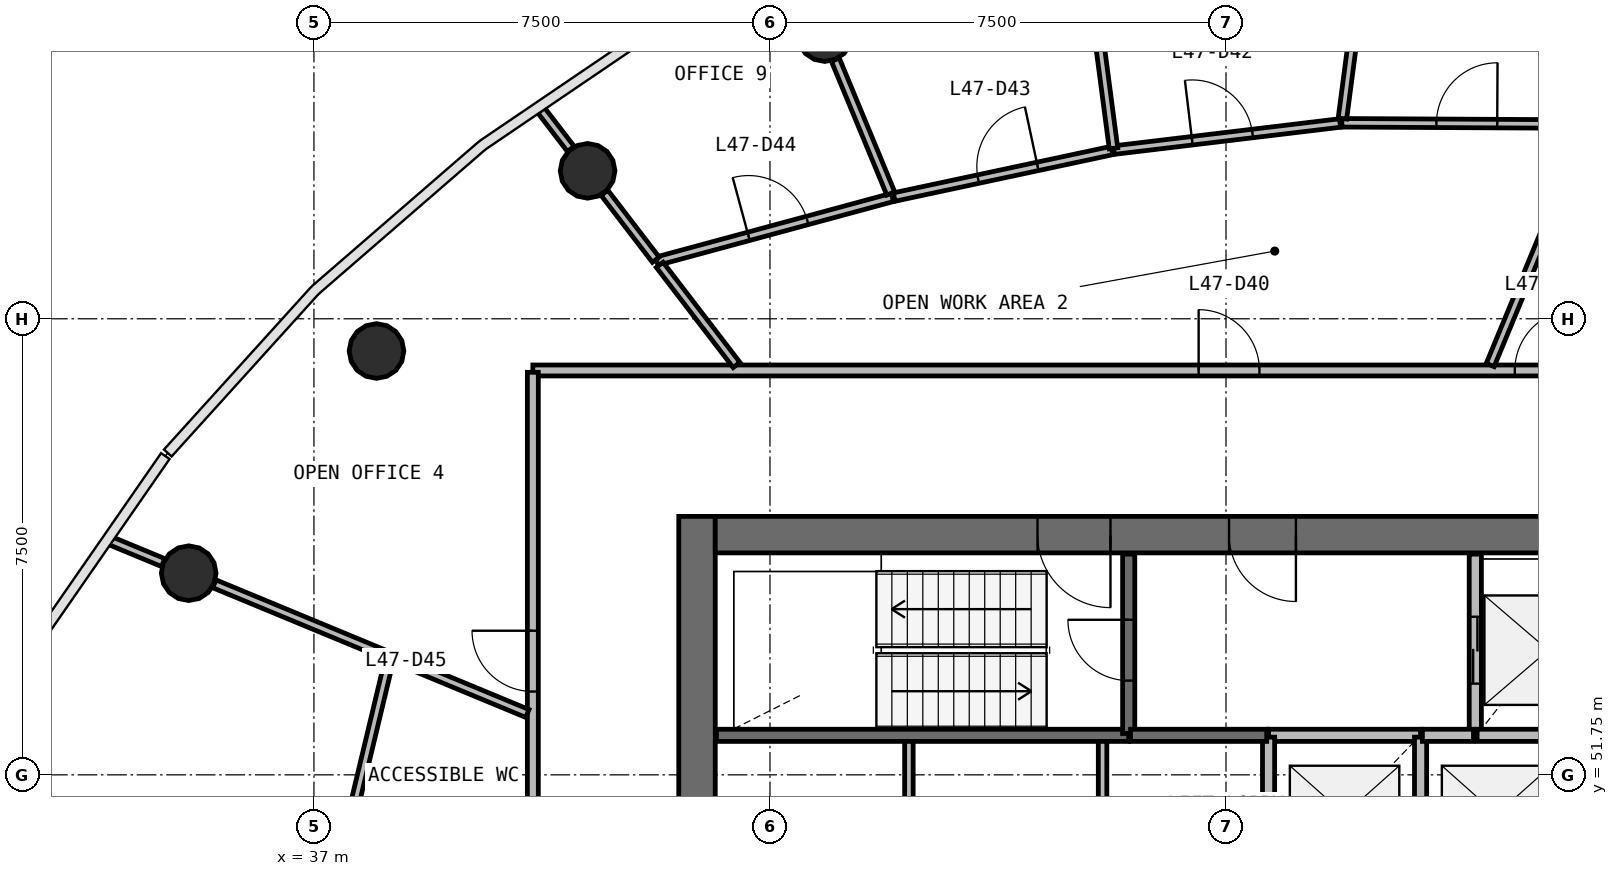
"""IFC4 building model, lengths in metres.
Left out: names, types, materials, properties, quantities, classifications, styles, units other than length and angle.
Written with IfcOpenShell. Run it as: python <this file> out.ifc"""

import sys

from ifc_helpers import new_model, si_unit, direction, frame, frame_2d, origin, origin_2d, place, context, subcontext, project, spatial, rectangle, circle, extrude, source, transform, mapped, element, fill, save


model = new_model("IFC4")
c1 = context("Model", 3, precision=1e-05, world=origin(), true_north=direction((0.0, 1.0)))
c2 = subcontext(c1, "Body", "Model", "MODEL_VIEW")
j1 = project(units=[si_unit("LENGTHUNIT", "METRE"), si_unit("PLANEANGLEUNIT", "RADIAN")], contexts=[c1])
p1 = place(None, origin())
s1 = spatial("IfcSite", under=j1, at=p1, CompositionType="ELEMENT")
p2 = place(p1, origin())
s2 = spatial("IfcBuilding", under=s1, at=p2, CompositionType="ELEMENT")
p3 = place(p2, frame((0.0, 0.0, 195.5)))
s3 = spatial("IfcBuildingStorey", under=s2, at=p3, CompositionType="ELEMENT", Elevation=195.5)
p4 = place(p3, frame((43.3, 56.0, 0.0), z_axis=(0.0, 0.0, 1.0), x_axis=(0.0, -1.0, 0.0)))
e1 = element("IfcWall", 1, at=p4, inside=s3, PredefinedType="SHEAR", context=c2, shape_type="SweptSolid", body=[
    extrude(rectangle(XDim=16.0, YDim=0.6, at=frame_2d((8.0, 0.0))), origin(), (0.0, 0.0, 1.0), 3.9),
])
p5 = place(p4, frame((7.1, 0.0, 0.0)))
e2 = element("IfcOpeningElement", 2, at=p5, cuts=e1, PredefinedType="OPENING", context=c2, shape_type="SweptSolid", body=[
    extrude(rectangle(XDim=1.8, YDim=2.1, at=frame_2d((0.9, 1.05))), frame((0.0, 0.31, 0.0), z_axis=(0.0, -1.0, 0.0), x_axis=(1.0, 0.0, 0.0)), (0.0, 0.0, 1.0), 0.62),
])
p6 = place(p3, frame((60.4, 55.7, 0.0), z_axis=(0.0, 0.0, 1.0), x_axis=(-1.0, 0.0, 0.0)))
e3 = element("IfcWall", 3, at=p6, inside=s3, PredefinedType="SHEAR", context=c2, shape_type="SweptSolid", body=[
    extrude(rectangle(XDim=16.8, YDim=0.6, at=frame_2d((8.4, 0.0))), origin(), (0.0, 0.0, 1.0), 3.9),
])
p7 = place(p6, frame((0.4, 0.0, 0.0)))
e4 = element("IfcOpeningElement", 4, at=p7, cuts=e3, PredefinedType="OPENING", context=c2, shape_type="SweptSolid", body=[
    extrude(rectangle(XDim=1.1, YDim=2.1, at=frame_2d((0.55, 1.05))), frame((0.0, 0.31, 0.0), z_axis=(0.0, -1.0, 0.0), x_axis=(1.0, 0.0, 0.0)), (0.0, 0.0, 1.0), 0.62),
])
p8 = place(p6, frame((10.3, 0.0, 0.0)))
e5 = element("IfcOpeningElement", 5, at=p8, cuts=e3, PredefinedType="OPENING", context=c2, shape_type="SweptSolid", body=[
    extrude(rectangle(XDim=1.2, YDim=2.1, at=frame_2d((0.6, 1.05))), frame((0.0, 0.31, 0.0), z_axis=(0.0, -1.0, 0.0), x_axis=(1.0, 0.0, 0.0)), (0.0, 0.0, 1.0), 0.62),
])
p9 = place(p6, frame((7.25, 0.0, 0.0)))
e6 = element("IfcOpeningElement", 6, at=p9, cuts=e3, PredefinedType="OPENING", context=c2, shape_type="SweptSolid", body=[
    extrude(rectangle(XDim=1.1, YDim=2.1, at=frame_2d((0.55, 1.05))), frame((0.0, 0.31, 0.0), z_axis=(0.0, -1.0, 0.0), x_axis=(1.0, 0.0, 0.0)), (0.0, 0.0, 1.0), 0.62),
])
m1 = source(origin(), c2, "Body", "SweptSolid", [
    extrude(circle(Radius=0.45, at=origin_2d()), origin(), (0.0, 0.0, 1.0), 3.9),
])
for number, where, z_axis, x_axis in (
    (7, (45.401, 63.931, 0.0), (0.0, 0.0, 1.0), (1.0, 0.0, 0.0)),
    (8, (41.501, 61.683, 0.0), (0.0, 0.0, 1.0), (1.0, 0.0, 0.0)),
    (9, (38.029, 58.72, 0.0), (0.0, 0.0, 1.0), (1.0, 0.0, 0.0)),
    (10, (34.941, 55.066, 0.0), (0.0, 0.0, 1.0), (1.0, 0.0, 0.0)),
):
    element("IfcColumn", number, at=place(p3, frame(where, z_axis=z_axis, x_axis=x_axis)), inside=s3, PredefinedType="COLUMN", context=c2, shape_type="MappedRepresentation", body=[
        mapped(m1, transform((0.0, 0.0, 0.0), scale=1.0)),
    ])
p10 = place(p3, frame((43.62, 52.4, 0.0), z_axis=(0.0, 0.0, 1.0), x_axis=(1.0, 0.0, 0.0)))
e11 = element("IfcWall", 11, at=p10, inside=s3, PredefinedType="SOLIDWALL", context=c2, shape_type="SweptSolid", body=[
    extrude(rectangle(XDim=6.78, YDim=0.2, at=frame_2d((3.39, 0.0))), origin(), (0.0, 0.0, 1.0), 3.58),
])
p11 = place(p3, frame((50.4, 52.43, 0.0), z_axis=(0.0, 0.0, 1.0), x_axis=(0.0, 1.0, 0.0)))
e12 = element("IfcWall", 12, at=p11, inside=s3, PredefinedType="SOLIDWALL", context=c2, shape_type="SweptSolid", body=[
    extrude(rectangle(XDim=2.95, YDim=0.2, at=frame_2d((1.475, 0.0))), origin(), (0.0, 0.0, 1.0), 3.58),
])
p12 = place(p11, frame((0.87, 0.0, 0.0)))
e13 = element("IfcOpeningElement", 13, at=p12, cuts=e12, PredefinedType="OPENING", context=c2, shape_type="SweptSolid", body=[
    extrude(rectangle(XDim=1.0, YDim=2.1, at=frame_2d((0.5, 1.05))), frame((0.0, 0.11, 0.0), z_axis=(0.0, -1.0, 0.0), x_axis=(1.0, 0.0, 0.0)), (0.0, 0.0, 1.0), 0.22),
])
p13 = place(p3, frame((56.1, 55.38, 0.0), z_axis=(0.0, 0.0, 1.0), x_axis=(0.0, -1.0, 0.0)))
e14 = element("IfcWall", 14, at=p13, inside=s3, PredefinedType="SOLIDWALL", context=c2, shape_type="SweptSolid", body=[
    extrude(rectangle(XDim=2.98, YDim=0.2, at=frame_2d((1.49, 0.0))), origin(), (0.0, 0.0, 1.0), 3.58),
])
p14 = place(p13, frame((1.03, 0.0, 0.0)))
e15 = element("IfcOpeningElement", 15, at=p14, cuts=e14, PredefinedType="OPENING", context=c2, shape_type="SweptSolid", body=[
    extrude(rectangle(XDim=1.1, YDim=2.1, at=frame_2d((0.55, 1.05))), frame((0.0, 0.11, 0.0), z_axis=(0.0, -1.0, 0.0), x_axis=(1.0, 0.0, 0.0)), (0.0, 0.0, 1.0), 0.22),
])
p15 = place(p3, frame((55.2, 52.4, 0.0), z_axis=(0.0, 0.0, 1.0), x_axis=(-1.0, 0.0, 0.0)))
e16 = element("IfcWall", 16, at=p15, inside=s3, PredefinedType="SOLIDWALL", context=c2, shape_type="SweptSolid", body=[
    extrude(rectangle(XDim=2.5, YDim=0.2, at=frame_2d((1.25, 0.0))), origin(), (0.0, 0.0, 1.0), 3.58),
])
for number, where, z_axis, x_axis in (
    (17, (52.7, 52.37, 0.0), (0.0, 0.0, 1.0), (0.0, -1.0, 0.0)),
    (18, (55.2, 50.01, 0.0), (0.0, 0.0, 1.0), (0.0, 1.0, 0.0)),
):
    element("IfcWall", number, at=place(p3, frame(where, z_axis=z_axis, x_axis=x_axis)), inside=s3, PredefinedType="SOLIDWALL", context=c2, shape_type="SweptSolid", body=[
        extrude(rectangle(XDim=2.36, YDim=0.2, at=frame_2d((1.18, 0.0))), origin(), (0.0, 0.0, 1.0), 3.58),
    ])
p16 = place(p3, frame((50.43, 52.4, 0.0), z_axis=(0.0, 0.0, 1.0), x_axis=(1.0, 0.0, 0.0)))
e19 = element("IfcWall", 19, at=p16, inside=s3, PredefinedType="SOLIDWALL", context=c2, shape_type="SweptSolid", body=[
    extrude(rectangle(XDim=2.24, YDim=0.2, at=frame_2d((1.12, 0.0))), origin(), (0.0, 0.0, 1.0), 3.58),
])
p17 = place(p3, frame((57.67, 52.4, 0.0), z_axis=(0.0, 0.0, 1.0), x_axis=(-1.0, 0.0, 0.0)))
e20 = element("IfcWall", 20, at=p17, inside=s3, PredefinedType="SOLIDWALL", context=c2, shape_type="SweptSolid", body=[
    extrude(rectangle(XDim=1.54, YDim=0.2, at=frame_2d((0.77, 0.0))), origin(), (0.0, 0.0, 1.0), 3.58),
])
p18 = place(p3, frame((56.07, 52.4, 0.0), z_axis=(0.0, 0.0, 1.0), x_axis=(-1.0, 0.0, 0.0)))
e21 = element("IfcWall", 21, at=p18, inside=s3, PredefinedType="SOLIDWALL", context=c2, shape_type="SweptSolid", body=[
    extrude(rectangle(XDim=0.84, YDim=0.2, at=frame_2d((0.42, 0.0))), origin(), (0.0, 0.0, 1.0), 3.58),
])
p19 = place(p3, frame((40.6, 58.4, 0.0), z_axis=(0.0, 0.0, 1.0), x_axis=(1.0, 0.0, 0.0)))
e22 = element("IfcWall", 22, at=p19, inside=s3, PredefinedType="PARTITIONING", context=c2, shape_type="SweptSolid", body=[
    extrude(rectangle(XDim=22.8, YDim=0.18, at=frame_2d((11.4, 0.0))), origin(), (0.0, 0.0, 1.0), 2.88),
])
p20 = place(p19, frame((16.15, 0.0, 0.0)))
e23 = element("IfcOpeningElement", 23, at=p20, cuts=e22, PredefinedType="OPENING", context=c2, shape_type="SweptSolid", body=[
    extrude(rectangle(XDim=1.0, YDim=2.1, at=frame_2d((0.5, 1.05))), frame((0.0, 0.1, 0.0), z_axis=(0.0, -1.0, 0.0), x_axis=(1.0, 0.0, 0.0)), (0.0, 0.0, 1.0), 0.2),
])
p21 = place(p19, frame((10.95, 0.0, 0.0)))
e24 = element("IfcOpeningElement", 24, at=p21, cuts=e22, PredefinedType="OPENING", context=c2, shape_type="SweptSolid", body=[
    extrude(rectangle(XDim=1.0, YDim=2.1, at=frame_2d((0.5, 1.05))), frame((0.0, 0.1, 0.0), z_axis=(0.0, -1.0, 0.0), x_axis=(1.0, 0.0, 0.0)), (0.0, 0.0, 1.0), 0.2),
])
p22 = place(p3, frame((40.6, 37.63, 0.0), z_axis=(0.0, 0.0, 1.0), x_axis=(0.0, 1.0, 0.0)))
e25 = element("IfcWall", 25, at=p22, inside=s3, PredefinedType="PARTITIONING", context=c2, shape_type="SweptSolid", body=[
    extrude(rectangle(XDim=20.74, YDim=0.18, at=frame_2d((10.37, 0.0))), origin(), (0.0, 0.0, 1.0), 2.88),
])
p23 = place(p22, frame((12.19, 0.0, 0.0)))
e26 = element("IfcOpeningElement", 26, at=p23, cuts=e25, PredefinedType="OPENING", context=c2, shape_type="SweptSolid", body=[
    extrude(rectangle(XDim=0.9, YDim=2.1, at=frame_2d((0.45, 1.05))), frame((0.0, 0.1, 0.0), z_axis=(0.0, -1.0, 0.0), x_axis=(1.0, 0.0, 0.0)), (0.0, 0.0, 1.0), 0.2),
])
p24 = place(p22, frame((9.99, 0.0, 0.0)))
e27 = element("IfcOpeningElement", 27, at=p24, cuts=e25, PredefinedType="OPENING", context=c2, shape_type="SweptSolid", body=[
    extrude(rectangle(XDim=0.9, YDim=2.1, at=frame_2d((0.45, 1.05))), frame((0.0, 0.1, 0.0), z_axis=(0.0, -1.0, 0.0), x_axis=(1.0, 0.0, 0.0)), (0.0, 0.0, 1.0), 0.2),
])
p25 = place(p22, frame((7.69, 0.0, 0.0)))
e28 = element("IfcOpeningElement", 28, at=p25, cuts=e25, PredefinedType="OPENING", context=c2, shape_type="SweptSolid", body=[
    extrude(rectangle(XDim=1.0, YDim=2.1, at=frame_2d((0.5, 1.05))), frame((0.0, 0.1, 0.0), z_axis=(0.0, -1.0, 0.0), x_axis=(1.0, 0.0, 0.0)), (0.0, 0.0, 1.0), 0.2),
])
p26 = place(p22, frame((15.49, 0.0, 0.0)))
e29 = element("IfcOpeningElement", 29, at=p26, cuts=e25, PredefinedType="OPENING", context=c2, shape_type="SweptSolid", body=[
    extrude(rectangle(XDim=1.0, YDim=2.1, at=frame_2d((0.5, 1.05))), frame((0.0, 0.1, 0.0), z_axis=(0.0, -1.0, 0.0), x_axis=(1.0, 0.0, 0.0)), (0.0, 0.0, 1.0), 0.2),
])
p27 = place(p3, frame((59.369, 65.789, 0.0), z_axis=(0.0, 0.0, 1.0), x_axis=(-0.382679289053, -0.923881248716, 0.0)))
e30 = element("IfcWall", 30, at=p27, inside=s3, PredefinedType="PARTITIONING", context=c2, shape_type="SweptSolid", body=[
    extrude(rectangle(XDim=7.901, YDim=0.14, at=frame_2d((3.95, 0.0))), origin(), (0.0, 0.0, 1.0), 2.88),
])
p28 = place(p3, frame((40.51, 52.759, 0.0), z_axis=(0.0, 0.0, 1.0), x_axis=(-0.9238758778, 0.382692255499, 0.0)))
e31 = element("IfcWall", 31, at=p28, inside=s3, PredefinedType="PARTITIONING", context=c2, shape_type="SweptSolid", body=[
    extrude(rectangle(XDim=5.573, YDim=0.14, at=frame_2d((2.787, 0.0))), origin(), (0.0, 0.0, 1.0), 2.88),
])
p29 = place(p3, frame((53.906, 62.473, 0.0), z_axis=(0.0, 0.0, 1.0), x_axis=(0.999985936292, -0.005303509904, 0.0)))
e32 = element("IfcWall", 32, at=p29, inside=s3, PredefinedType="PARTITIONING", context=c2, shape_type="SweptSolid", body=[
    extrude(rectangle(XDim=4.005, YDim=0.14, at=frame_2d((2.002, 0.0))), origin(), (0.0, 0.0, 1.0), 2.88),
])
p30 = place(p29, frame((1.555, 0.0, 0.0)))
e33 = element("IfcOpeningElement", 33, at=p30, cuts=e32, PredefinedType="OPENING", context=c2, shape_type="SweptSolid", body=[
    extrude(rectangle(XDim=1.0, YDim=2.1, at=frame_2d((0.5, 1.05))), frame((0.0, 0.08, 0.0), z_axis=(0.0, -1.0, 0.0), x_axis=(1.0, 0.0, 0.0)), (0.0, 0.0, 1.0), 0.16),
])
p31 = place(p3, frame((42.641, 60.198, 0.0), z_axis=(0.0, 0.0, 1.0), x_axis=(0.965275935765, 0.261232401957, 0.0)))
e34 = element("IfcWall", 34, at=p31, inside=s3, PredefinedType="PARTITIONING", context=c2, shape_type="SweptSolid", body=[
    extrude(rectangle(XDim=4.012, YDim=0.14, at=frame_2d((2.006, 0.0))), origin(), (0.0, 0.0, 1.0), 2.88),
])
p32 = place(p31, frame((1.562, 0.0, 0.0)))
e35 = element("IfcOpeningElement", 35, at=p32, cuts=e34, PredefinedType="OPENING", context=c2, shape_type="SweptSolid", body=[
    extrude(rectangle(XDim=1.0, YDim=2.1, at=frame_2d((0.5, 1.05))), frame((0.0, 0.08, 0.0), z_axis=(0.0, -1.0, 0.0), x_axis=(1.0, 0.0, 0.0)), (0.0, 0.0, 1.0), 0.16),
])
p33 = place(p3, frame((38.235, 53.626, 0.0), z_axis=(0.0, 0.0, 1.0), x_axis=(-0.232775534837, -0.97253048815, 0.0)))
e36 = element("IfcWall", 36, at=p33, inside=s3, PredefinedType="PARTITIONING", context=c2, shape_type="SweptSolid", body=[
    extrude(rectangle(XDim=3.771, YDim=0.14, at=frame_2d((1.886, 0.0))), origin(), (0.0, 0.0, 1.0), 2.88),
])
p34 = place(p3, frame((50.154, 62.023, 0.0), z_axis=(0.0, 0.0, 1.0), x_axis=(0.992895317482, 0.118991127913, 0.0)))
e37 = element("IfcWall", 37, at=p34, inside=s3, PredefinedType="PARTITIONING", context=c2, shape_type="SweptSolid", body=[
    extrude(rectangle(XDim=3.749, YDim=0.14, at=frame_2d((1.874, 0.0))), origin(), (0.0, 0.0, 1.0), 2.88),
])
p35 = place(p34, frame((1.299, 0.0, 0.0)))
e38 = element("IfcOpeningElement", 38, at=p35, cuts=e37, PredefinedType="OPENING", context=c2, shape_type="SweptSolid", body=[
    extrude(rectangle(XDim=1.0, YDim=2.1, at=frame_2d((0.5, 1.05))), frame((0.0, 0.08, 0.0), z_axis=(0.0, -1.0, 0.0), x_axis=(1.0, 0.0, 0.0)), (0.0, 0.0, 1.0), 0.16),
])
p36 = place(p3, frame((46.543, 61.252, 0.0), z_axis=(0.0, 0.0, 1.0), x_axis=(0.977922236045, 0.208969137073, 0.0)))
e39 = element("IfcWall", 39, at=p36, inside=s3, PredefinedType="PARTITIONING", context=c2, shape_type="SweptSolid", body=[
    extrude(rectangle(XDim=3.663, YDim=0.14, at=frame_2d((1.831, 0.0))), origin(), (0.0, 0.0, 1.0), 2.88),
])
p37 = place(p36, frame((1.413, 0.0, 0.0)))
e40 = element("IfcOpeningElement", 40, at=p37, cuts=e39, PredefinedType="OPENING", context=c2, shape_type="SweptSolid", body=[
    extrude(rectangle(XDim=1.0, YDim=2.1, at=frame_2d((0.5, 1.05))), frame((0.0, 0.08, 0.0), z_axis=(0.0, -1.0, 0.0), x_axis=(1.0, 0.0, 0.0)), (0.0, 0.0, 1.0), 0.16),
])
p38 = place(p3, frame((53.915, 62.543, 0.0), z_axis=(0.0, 0.0, 1.0), x_axis=(0.130589863737, 0.99143647678, 0.0)))
e41 = element("IfcWall", 41, at=p38, inside=s3, PredefinedType="PARTITIONING", context=c2, shape_type="SweptSolid", body=[
    extrude(rectangle(XDim=3.313, YDim=0.14, at=frame_2d((1.656, 0.0))), origin(), (0.0, 0.0, 1.0), 2.88),
])
p39 = place(p3, frame((50.15, 62.053, 0.0), z_axis=(0.0, 0.0, 1.0), x_axis=(-0.130539730855, 0.991443078885, 0.0)))
e42 = element("IfcWall", 42, at=p39, inside=s3, PredefinedType="PARTITIONING", context=c2, shape_type="SweptSolid", body=[
    extrude(rectangle(XDim=2.964, YDim=0.14, at=frame_2d((1.482, 0.0))), origin(), (0.0, 0.0, 1.0), 2.88),
])
p40 = place(p3, frame((46.487, 61.311, 0.0), z_axis=(0.0, 0.0, 1.0), x_axis=(-0.38269282806, 0.923875640631, 0.0)))
e43 = element("IfcWall", 43, at=p40, inside=s3, PredefinedType="PARTITIONING", context=c2, shape_type="SweptSolid", body=[
    extrude(rectangle(XDim=2.382, YDim=0.14, at=frame_2d((1.191, 0.0))), origin(), (0.0, 0.0, 1.0), 2.88),
])
for number, where, z_axis, x_axis in (
    (44, (46.785, 50.01, 0.0), (0.0, 0.0, 1.0), (0.0, 1.0, 0.0)),
    (45, (49.97, 50.01, 0.0), (0.0, 0.0, 1.0), (0.0, 1.0, 0.0)),
):
    element("IfcWall", number, at=place(p3, frame(where, z_axis=z_axis, x_axis=x_axis)), inside=s3, PredefinedType="PARTITIONING", context=c2, shape_type="SweptSolid", body=[
        extrude(rectangle(XDim=2.29, YDim=0.14, at=frame_2d((1.145, 0.0))), origin(), (0.0, 0.0, 1.0), 2.88),
    ])
p41 = place(p3, frame((43.951, 58.49, 0.0), z_axis=(0.0, 0.0, 1.0), x_axis=(-0.60869315722, 0.793405722411, 0.0)))
e46 = element("IfcWall", 46, at=p41, inside=s3, PredefinedType="PARTITIONING", context=c2, shape_type="SweptSolid", body=[
    extrude(rectangle(XDim=2.076, YDim=0.14, at=frame_2d((1.038, 0.0))), origin(), (0.0, 0.0, 1.0), 2.88),
])
p42 = place(p3, frame((42.622, 60.221, 0.0), z_axis=(0.0, 0.0, 1.0), x_axis=(-0.608715815007, 0.793388339063, 0.0)))
e47 = element("IfcWall", 47, at=p42, inside=s3, PredefinedType="PARTITIONING", context=c2, shape_type="SweptSolid", body=[
    extrude(rectangle(XDim=1.388, YDim=0.14, at=frame_2d((0.694, 0.0))), origin(), (0.0, 0.0, 1.0), 2.88),
])
p43 = place(p3, frame((34.52, 55.24, 0.0), z_axis=(0.0, 0.0, 1.0), x_axis=(-0.923934603914, 0.382550451171, 0.0)))
e48 = element("IfcWall", 48, at=p43, inside=s3, PredefinedType="PARTITIONING", context=c2, shape_type="SweptSolid", body=[
    extrude(rectangle(XDim=0.941, YDim=0.14, at=frame_2d((0.47, 0.0))), origin(), (0.0, 0.0, 1.0), 2.88),
])
p44 = place(p3, frame((41.224, 62.044, 0.0), z_axis=(0.0, 0.0, 1.0), x_axis=(-0.608783126566, 0.793336690698, 0.0)))
e49 = element("IfcWall", 49, at=p44, inside=s3, PredefinedType="PARTITIONING", context=c2, shape_type="SweptSolid", body=[
    extrude(rectangle(XDim=0.802, YDim=0.14, at=frame_2d((0.401, 0.0))), origin(), (0.0, 0.0, 1.0), 2.88),
])
m2 = source(origin(), c2, "Body", "SweptSolid", [
    extrude(rectangle(XDim=1.1, YDim=2.1, at=frame_2d((0.55, 1.05))), frame((0.0, 0.025, 0.0), z_axis=(0.0, -1.0, 0.0), x_axis=(1.0, 0.0, 0.0)), (0.0, 0.0, 1.0), 0.05),
])
p45 = place(p14, origin())
e50 = element("IfcDoor", 50, at=p45, inside=s3, OperationType="DOUBLE_DOOR_SLIDING", PredefinedType="USERDEFINED", context=c2, shape_type="MappedRepresentation", body=[
    mapped(m2, transform((0.0, 0.0, 0.0), scale=1.0)),
])
fill(e15, e50)
m3 = source(origin(), c2, "Body", "SweptSolid", [
    extrude(rectangle(XDim=1.2, YDim=2.1, at=frame_2d((0.6, 1.05))), frame((0.0, 0.025, 0.0), z_axis=(0.0, -1.0, 0.0), x_axis=(1.0, 0.0, 0.0)), (0.0, 0.0, 1.0), 0.05),
])
p46 = place(p8, origin())
e51 = element("IfcDoor", 51, at=p46, inside=s3, OperationType="SINGLE_SWING_LEFT", PredefinedType="DOOR", context=c2, shape_type="MappedRepresentation", body=[
    mapped(m3, transform((0.0, 0.0, 0.0), scale=1.0)),
])
fill(e5, e51)
m4 = source(origin(), c2, "Body", "SweptSolid", [
    extrude(rectangle(XDim=1.0, YDim=2.1, at=frame_2d((0.5, 1.05))), frame((0.0, 0.025, 0.0), z_axis=(0.0, -1.0, 0.0), x_axis=(1.0, 0.0, 0.0)), (0.0, 0.0, 1.0), 0.05),
])
p47 = place(p12, origin())
e52 = element("IfcDoor", 52, at=p47, inside=s3, OperationType="SINGLE_SWING_RIGHT", PredefinedType="DOOR", context=c2, shape_type="MappedRepresentation", body=[
    mapped(m4, transform((0.0, 0.0, 0.0), scale=1.0)),
])
fill(e13, e52)
m5 = source(origin(), c2, "Body", "SweptSolid", [
    extrude(rectangle(XDim=1.1, YDim=2.1, at=frame_2d((0.55, 1.05))), frame((0.0, 0.025, 0.0), z_axis=(0.0, -1.0, 0.0), x_axis=(1.0, 0.0, 0.0)), (0.0, 0.0, 1.0), 0.05),
])
p48 = place(p9, origin())
e53 = element("IfcDoor", 53, at=p48, inside=s3, OperationType="SINGLE_SWING_LEFT", PredefinedType="DOOR", context=c2, shape_type="MappedRepresentation", body=[
    mapped(m5, transform((0.0, 0.0, 0.0), scale=1.0)),
])
fill(e6, e53)
m6 = source(origin(), c2, "Body", "SweptSolid", [
    extrude(rectangle(XDim=1.0, YDim=2.1, at=frame_2d((0.5, 1.05))), frame((0.0, 0.025, 0.0), z_axis=(0.0, -1.0, 0.0), x_axis=(1.0, 0.0, 0.0)), (0.0, 0.0, 1.0), 0.05),
])
p49 = place(p20, origin())
e54 = element("IfcDoor", 54, at=p49, inside=s3, OperationType="SINGLE_SWING_RIGHT", PredefinedType="DOOR", context=c2, shape_type="MappedRepresentation", body=[
    mapped(m6, transform((0.0, 0.0, 0.0), scale=1.0)),
])
fill(e23, e54)
p50 = place(p21, origin())
e55 = element("IfcDoor", 55, at=p50, inside=s3, OperationType="SINGLE_SWING_LEFT", PredefinedType="DOOR", context=c2, shape_type="MappedRepresentation", body=[
    mapped(m6, transform((0.0, 0.0, 0.0), scale=1.0)),
])
fill(e24, e55)
p51 = place(p30, origin())
e56 = element("IfcDoor", 56, at=p51, inside=s3, OperationType="SINGLE_SWING_RIGHT", PredefinedType="DOOR", context=c2, shape_type="MappedRepresentation", body=[
    mapped(m6, transform((0.0, 0.0, 0.0), scale=1.0)),
])
fill(e33, e56)
p52 = place(p35, origin())
e57 = element("IfcDoor", 57, at=p52, inside=s3, OperationType="SINGLE_SWING_LEFT", PredefinedType="DOOR", context=c2, shape_type="MappedRepresentation", body=[
    mapped(m6, transform((0.0, 0.0, 0.0), scale=1.0)),
])
fill(e38, e57)
p53 = place(p37, origin())
e58 = element("IfcDoor", 58, at=p53, inside=s3, OperationType="SINGLE_SWING_RIGHT", PredefinedType="DOOR", context=c2, shape_type="MappedRepresentation", body=[
    mapped(m6, transform((0.0, 0.0, 0.0), scale=1.0)),
])
fill(e40, e58)
p54 = place(p32, origin())
e59 = element("IfcDoor", 59, at=p54, inside=s3, OperationType="SINGLE_SWING_LEFT", PredefinedType="DOOR", context=c2, shape_type="MappedRepresentation", body=[
    mapped(m6, transform((0.0, 0.0, 0.0), scale=1.0)),
])
fill(e35, e59)
p55 = place(p26, origin())
e60 = element("IfcDoor", 60, at=p55, inside=s3, OperationType="SINGLE_SWING_RIGHT", PredefinedType="DOOR", context=c2, shape_type="MappedRepresentation", body=[
    mapped(m6, transform((0.0, 0.0, 0.0), scale=1.0)),
])
fill(e29, e60)
save(model, sys.argv[1])
